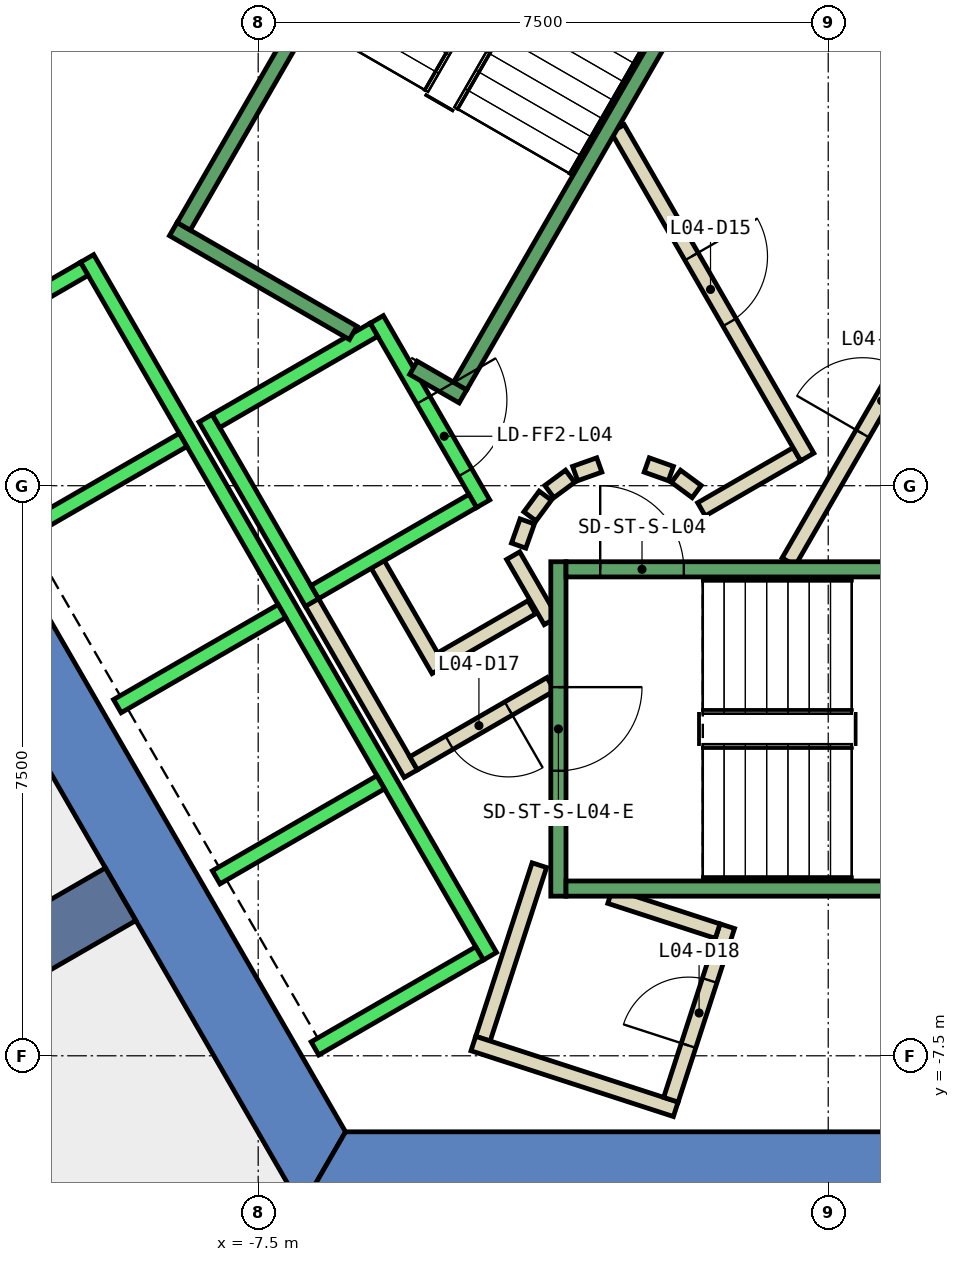
"""IFC4 building model, lengths in metres.
Left out: names, types, materials, properties, quantities, classifications, styles, units other than length and angle.
Written with IfcOpenShell. Run it as: python <this file> out.ifc"""

import sys

from ifc_helpers import new_model, si_unit, direction, frame, frame_2d, origin, place, context, subcontext, project, spatial, polyline, rectangle, outline, extrude, element, fill, save


model = new_model("IFC4")
c1 = context("Model", 3, precision=1e-05, world=origin(), true_north=direction((0.0, 1.0)))
c2 = subcontext(c1, "Body", "Model", "MODEL_VIEW")
j1 = project(units=[si_unit("LENGTHUNIT", "METRE"), si_unit("PLANEANGLEUNIT", "RADIAN")], contexts=[c1])
p1 = place(None, origin())
s1 = spatial("IfcSite", under=j1, at=p1, CompositionType="ELEMENT")
p2 = place(p1, origin())
s2 = spatial("IfcBuilding", under=s1, at=p2, CompositionType="ELEMENT")
p3 = place(p2, frame((0.0, 0.0, 25.0)))
s3 = spatial("IfcBuildingStorey", under=s2, at=p3, CompositionType="ELEMENT", Elevation=25.0)
p4 = place(p3, frame((0.0, 0.0, -0.45)))
e1 = element("IfcWall", 1, at=p4, inside=s3, PredefinedType="SHEAR", context=c2, shape_type="SweptSolid", body=[
    extrude(outline(polyline([(-12.267, 5.252), (-11.402, 4.752), (-6.351, 13.5), (-6.928, 14.5), (-12.267, 5.252)])), origin(), (0.0, 0.0, 1.0), 5.0),
])
p5 = place(p3, frame((0.0, 0.0, -0.45)))
e2 = element("IfcWall", 2, at=p5, inside=s3, PredefinedType="SHEAR", context=c2, shape_type="SweptSolid", body=[
    extrude(outline(polyline([(-13.856, 2.5), (-6.928, -9.5), (-6.351, -8.5), (-12.702, 2.5), (-13.856, 2.5)])), origin(), (0.0, 0.0, 1.0), 5.0),
])
p6 = place(p3, frame((0.0, 0.0, -0.45)))
e3 = element("IfcWall", 3, at=p6, inside=s3, PredefinedType="SHEAR", context=c2, shape_type="SweptSolid", body=[
    extrude(outline(polyline([(3.75, -9.5), (3.75, -8.5), (-6.351, -8.5), (-6.928, -9.5), (3.75, -9.5)])), origin(), (0.0, 0.0, 1.0), 5.0),
])
p7 = place(p3, frame((-9.31, -5.375, -0.45), z_axis=(0.0, 0.0, 1.0), x_axis=(-0.866017533419, -0.500013631625, 0.0)))
e4 = element("IfcWall", 4, at=p7, inside=s3, PredefinedType="SHEAR", context=c2, shape_type="SweptSolid", body=[
    extrude(rectangle(XDim=9.0, YDim=0.8, at=frame_2d((4.5, 0.0))), origin(), (0.0, 0.0, 1.0), 5.0),
])
p8 = place(p3, frame((-3.9, -1.599, 0.0), z_axis=(0.0, 0.0, 1.0), x_axis=(-0.865969445389, -0.500096910261, 0.0)))
e5 = element("IfcWall", 5, at=p8, inside=s3, PredefinedType="PARTITIONING", context=c2, shape_type="SweptSolid", body=[
    extrude(rectangle(XDim=1.373, YDim=0.2, at=frame_2d((0.687, 0.0))), origin(), (0.0, 0.0, 1.0), 4.55),
])
p9 = place(p3, frame((-5.126, -2.422, 0.0), z_axis=(0.0, 0.0, 1.0), x_axis=(-0.500062241894, 0.865989465428, 0.0)))
e6 = element("IfcWall", 6, at=p9, inside=s3, PredefinedType="PARTITIONING", context=c2, shape_type="SweptSolid", body=[
    extrude(rectangle(XDim=1.7, YDim=0.2, at=frame_2d((0.85, 0.0))), origin(), (0.0, 0.0, 1.0), 4.55),
])
p10 = place(p3, frame((-5.492, -3.788, 0.0), z_axis=(0.0, 0.0, 1.0), x_axis=(-0.500008949224, 0.866020236886, 0.0)))
e7 = element("IfcWall", 7, at=p10, inside=s3, PredefinedType="PARTITIONING", context=c2, shape_type="SweptSolid", body=[
    extrude(rectangle(XDim=2.68, YDim=0.2, at=frame_2d((1.34, 0.0))), origin(), (0.0, 0.0, 1.0), 4.55),
])
p11 = place(p3, frame((-4.145, -0.92, 0.0), z_axis=(0.0, 0.0, 1.0), x_axis=(0.499743786207, -0.866173278362, 0.0)))
e8 = element("IfcWall", 8, at=p11, inside=s3, PredefinedType="PARTITIONING", context=c2, shape_type="SweptSolid", body=[
    extrude(rectangle(XDim=0.991, YDim=0.2, at=frame_2d((0.495, 0.0))), origin(), (0.0, 0.0, 1.0), 4.55),
])
p12 = place(p3, frame((-3.65, -2.61, 0.0), z_axis=(0.0, 0.0, 1.0), x_axis=(-0.866072462134, -0.499918483688, 0.0)))
e9 = element("IfcWall", 9, at=p12, inside=s3, PredefinedType="PARTITIONING", context=c2, shape_type="SweptSolid", body=[
    extrude(rectangle(XDim=2.084, YDim=0.2, at=frame_2d((1.042, 0.0))), origin(), (0.0, 0.0, 1.0), 4.55),
])
p13 = place(p12, frame((0.642, 0.0, 0.0)))
e10 = element("IfcOpeningElement", 10, at=p13, cuts=e9, PredefinedType="OPENING", context=c2, shape_type="SweptSolid", body=[
    extrude(rectangle(XDim=0.9, YDim=2.1, at=frame_2d((0.45, 1.05))), frame((0.0, 0.11, 0.0), z_axis=(0.0, -1.0, 0.0), x_axis=(1.0, 0.0, 0.0)), (0.0, 0.0, 1.0), 0.22),
])
p14 = place(p3, frame((-3.801, -4.992, 0.0), z_axis=(0.0, 0.0, 1.0), x_axis=(-0.309079173229, -0.951036310914, 0.0)))
e11 = element("IfcWall", 11, at=p14, inside=s3, PredefinedType="PARTITIONING", context=c2, shape_type="SweptSolid", body=[
    extrude(rectangle(XDim=2.4, YDim=0.2, at=frame_2d((1.2, 0.0))), origin(), (0.0, 0.0, 1.0), 4.55),
])
p15 = place(p3, frame((-4.669, -7.339, 0.0), z_axis=(0.0, 0.0, 1.0), x_axis=(0.951079555704, -0.308946077369, 0.0)))
e12 = element("IfcWall", 12, at=p15, inside=s3, PredefinedType="PARTITIONING", context=c2, shape_type="SweptSolid", body=[
    extrude(rectangle(XDim=2.8, YDim=0.2, at=frame_2d((1.4, 0.0))), origin(), (0.0, 0.0, 1.0), 4.55),
])
p16 = place(p3, frame((-2.07, -8.078, 0.0), z_axis=(0.0, 0.0, 1.0), x_axis=(0.309171157328, 0.951006411901, 0.0)))
e13 = element("IfcWall", 13, at=p16, inside=s3, PredefinedType="PARTITIONING", context=c2, shape_type="SweptSolid", body=[
    extrude(rectangle(XDim=2.401, YDim=0.2, at=frame_2d((1.2, 0.0))), origin(), (0.0, 0.0, 1.0), 4.55),
])
p17 = place(p16, frame((0.75, 0.0, 0.0)))
e14 = element("IfcOpeningElement", 14, at=p17, cuts=e13, PredefinedType="OPENING", context=c2, shape_type="SweptSolid", body=[
    extrude(rectangle(XDim=0.9, YDim=2.1, at=frame_2d((0.45, 1.05))), frame((0.0, 0.11, 0.0), z_axis=(0.0, -1.0, 0.0), x_axis=(1.0, 0.0, 0.0)), (0.0, 0.0, 1.0), 0.22),
])
p18 = place(p3, frame((-1.455, -5.86, 0.0), z_axis=(0.0, 0.0, 1.0), x_axis=(-0.950892787506, 0.309520446287, 0.0)))
e15 = element("IfcWall", 15, at=p18, inside=s3, PredefinedType="PARTITIONING", context=c2, shape_type="SweptSolid", body=[
    extrude(rectangle(XDim=1.487, YDim=0.2, at=frame_2d((0.743, 0.0))), origin(), (0.0, 0.0, 1.0), 4.55),
])
p19 = place(p3, frame((-0.52, -1.0, 0.0), z_axis=(0.0, 0.0, 1.0), x_axis=(0.50011622646, 0.865958290007, 0.0)))
e16 = element("IfcWall", 16, at=p19, inside=s3, PredefinedType="PARTITIONING", context=c2, shape_type="SweptSolid", body=[
    extrude(rectangle(XDim=4.991, YDim=0.2, at=frame_2d((2.496, 0.0))), origin(), (0.0, 0.0, 1.0), 4.55),
])
p20 = place(p19, frame((1.945, 0.0, 0.0)))
e17 = element("IfcOpeningElement", 17, at=p20, cuts=e16, PredefinedType="OPENING", context=c2, shape_type="SweptSolid", body=[
    extrude(rectangle(XDim=1.0, YDim=2.1, at=frame_2d((0.5, 1.05))), frame((0.0, 0.11, 0.0), z_axis=(0.0, -1.0, 0.0), x_axis=(1.0, 0.0, 0.0)), (0.0, 0.0, 1.0), 0.22),
])
p21 = place(p3, frame((-0.412, 0.414, 0.0), z_axis=(0.0, 0.0, 1.0), x_axis=(-0.866017369001, -0.500013916395, 0.0)))
e18 = element("IfcWall", 18, at=p21, inside=s3, PredefinedType="PARTITIONING", context=c2, shape_type="SweptSolid", body=[
    extrude(rectangle(XDim=1.45, YDim=0.2, at=frame_2d((0.725, 0.0))), origin(), (0.0, 0.0, 1.0), 4.55),
])
p22 = place(p3, frame((-1.731, -0.077, 0.0), z_axis=(0.0, 0.0, 1.0), x_axis=(-0.804311165252, 0.594208338422, 0.0)))
e19 = element("IfcWall", 19, at=p22, inside=s3, PredefinedType="PARTITIONING", context=c2, shape_type="SweptSolid", body=[
    extrude(rectangle(XDim=0.338, YDim=0.2, at=frame_2d((0.169, 0.0))), origin(), (0.0, 0.0, 1.0), 4.55),
])
p23 = place(p3, frame((-2.07, 0.16, 0.0), z_axis=(0.0, 0.0, 1.0), x_axis=(-0.942199461132, 0.335052496547, 0.0)))
e20 = element("IfcWall", 20, at=p23, inside=s3, PredefinedType="PARTITIONING", context=c2, shape_type="SweptSolid", body=[
    extrude(rectangle(XDim=0.337, YDim=0.2, at=frame_2d((0.169, 0.0))), origin(), (0.0, 0.0, 1.0), 4.55),
])
p24 = place(p3, frame((-3.012, 0.273, 0.0), z_axis=(0.0, 0.0, 1.0), x_axis=(-0.942280615813, -0.334824194261, 0.0)))
e21 = element("IfcWall", 21, at=p24, inside=s3, PredefinedType="PARTITIONING", context=c2, shape_type="SweptSolid", body=[
    extrude(rectangle(XDim=0.338, YDim=0.2, at=frame_2d((0.169, 0.0))), origin(), (0.0, 0.0, 1.0), 4.55),
])
p25 = place(p3, frame((-3.397, 0.124, 0.0), z_axis=(0.0, 0.0, 1.0), x_axis=(-0.804311165252, -0.594208338422, 0.0)))
e22 = element("IfcWall", 22, at=p25, inside=s3, PredefinedType="PARTITIONING", context=c2, shape_type="SweptSolid", body=[
    extrude(rectangle(XDim=0.338, YDim=0.2, at=frame_2d((0.169, 0.0))), origin(), (0.0, 0.0, 1.0), 4.55),
])
p26 = place(p3, frame((-3.723, -0.131, 0.0), z_axis=(0.0, 0.0, 1.0), x_axis=(-0.594675113454, -0.803966112121, 0.0)))
e23 = element("IfcWall", 23, at=p26, inside=s3, PredefinedType="PARTITIONING", context=c2, shape_type="SweptSolid", body=[
    extrude(rectangle(XDim=0.338, YDim=0.2, at=frame_2d((0.169, 0.0))), origin(), (0.0, 0.0, 1.0), 4.55),
])
p27 = place(p3, frame((-3.96, -0.47, 0.0), z_axis=(0.0, 0.0, 1.0), x_axis=(-0.334824194261, -0.942280615813, 0.0)))
e24 = element("IfcWall", 24, at=p27, inside=s3, PredefinedType="PARTITIONING", context=c2, shape_type="SweptSolid", body=[
    extrude(rectangle(XDim=0.338, YDim=0.2, at=frame_2d((0.169, 0.0))), origin(), (0.0, 0.0, 1.0), 4.55),
])
p28 = place(p3, frame((-2.771, 4.7, 0.0), z_axis=(0.0, 0.0, 1.0), x_axis=(0.499969479948, -0.866043023828, 0.0)))
e25 = element("IfcWall", 25, at=p28, inside=s3, PredefinedType="PARTITIONING", context=c2, shape_type="SweptSolid", body=[
    extrude(rectangle(XDim=4.99, YDim=0.2, at=frame_2d((2.495, 0.0))), origin(), (0.0, 0.0, 1.0), 4.55),
])
p29 = place(p28, frame((1.945, 0.0, 0.0)))
e26 = element("IfcOpeningElement", 26, at=p29, cuts=e25, PredefinedType="OPENING", context=c2, shape_type="SweptSolid", body=[
    extrude(rectangle(XDim=1.0, YDim=2.1, at=frame_2d((0.5, 1.05))), frame((0.0, 0.11, 0.0), z_axis=(0.0, -1.0, 0.0), x_axis=(1.0, 0.0, 0.0)), (0.0, 0.0, 1.0), 0.22),
])
p30 = place(p3, frame((-5.94, 2.188, 0.0), z_axis=(0.0, 0.0, 1.0), x_axis=(0.49994636267, -0.866056369097, 0.0)))
e27 = element("IfcWall", 27, at=p30, inside=s3, PredefinedType="STANDARD", context=c2, shape_type="SweptSolid", body=[
    extrude(rectangle(XDim=2.8, YDim=0.2, at=frame_2d((1.4, 0.0))), origin(), (0.0, 0.0, 1.0), 4.55),
])
p31 = place(p30, frame((1.225, 0.0, 0.0)))
e28 = element("IfcOpeningElement", 28, at=p31, cuts=e27, PredefinedType="OPENING", context=c2, shape_type="SweptSolid", body=[
    extrude(rectangle(XDim=1.1, YDim=2.1, at=frame_2d((0.55, 1.05))), frame((0.0, 0.11, 0.0), z_axis=(0.0, -1.0, 0.0), x_axis=(1.0, 0.0, 0.0)), (0.0, 0.0, 1.0), 0.22),
])
p32 = place(p3, frame((-8.192, 0.888, 0.0), z_axis=(0.0, 0.0, 1.0), x_axis=(0.49994636267, -0.866056369097, 0.0)))
e29 = element("IfcWall", 29, at=p32, inside=s3, PredefinedType="STANDARD", context=c2, shape_type="SweptSolid", body=[
    extrude(rectangle(XDim=2.8, YDim=0.2, at=frame_2d((1.4, 0.0))), origin(), (0.0, 0.0, 1.0), 4.55),
])
for number, where, z_axis, x_axis in (
    (30, (-5.977, 2.052, 0.0), (0.0, 0.0, 1.0), (-0.866, -0.5, 0.0)),
    (31, (-4.677, -0.2, 0.0), (0.0, 0.0, 1.0), (-0.866, -0.5, 0.0)),
):
    element("IfcWall", number, at=place(p3, frame(where, z_axis=z_axis, x_axis=x_axis)), inside=s3, PredefinedType="STANDARD", context=c2, shape_type="SweptSolid", body=[
        extrude(rectangle(XDim=2.399, YDim=0.2, at=frame_2d((1.2, 0.0))), origin(), (0.0, 0.0, 1.0), 4.55),
    ])
p33 = place(p3, frame((-9.751, 2.99, 0.0), z_axis=(0.0, 0.0, 1.0), x_axis=(0.50000090737, -0.866024879913, 0.0)))
e32 = element("IfcWall", 32, at=p33, inside=s3, PredefinedType="STANDARD", context=c2, shape_type="SweptSolid", body=[
    extrude(rectangle(XDim=10.6, YDim=0.2, at=frame_2d((5.3, 0.0))), origin(), (0.0, 0.0, 1.0), 4.55),
])
p34 = place(p3, frame((-9.788, 2.853, 0.0), z_axis=(0.0, 0.0, 1.0), x_axis=(-0.865998541277, -0.500046524342, 0.0)))
e33 = element("IfcWall", 33, at=p34, inside=s3, PredefinedType="STANDARD", context=c2, shape_type="SweptSolid", body=[
    extrude(rectangle(XDim=2.5, YDim=0.2, at=frame_2d((1.25, 0.0))), origin(), (0.0, 0.0, 1.0), 4.55),
])
for number, where, z_axis, x_axis in (
    (34, (-8.488, 0.602, 0.0), (0.0, 0.0, 1.0), (-0.866, -0.5, 0.0)),
    (35, (-7.188, -1.65, 0.0), (0.0, 0.0, 1.0), (-0.866, -0.5, 0.0)),
    (36, (-5.888, -3.902, 0.0), (0.0, 0.0, 1.0), (-0.866, -0.5, 0.0)),
    (37, (-4.588, -6.153, 0.0), (0.0, 0.0, 1.0), (-0.866, -0.5, 0.0)),
):
    element("IfcWall", number, at=place(p3, frame(where, z_axis=z_axis, x_axis=x_axis)), inside=s3, PredefinedType="STANDARD", context=c2, shape_type="SweptSolid", body=[
        extrude(rectangle(XDim=2.5, YDim=0.2, at=frame_2d((1.25, 0.0))), origin(), (0.0, 0.0, 1.0), 4.55),
    ])
p35 = place(p3, frame((-3.55, -1.0, 0.0), z_axis=(0.0, 0.0, 1.0), x_axis=(0.0, -1.0, 0.0)))
e38 = element("IfcWall", 38, at=p35, inside=s3, PredefinedType="STANDARD", context=c2, shape_type="SweptSolid", body=[
    extrude(rectangle(XDim=4.4, YDim=0.2, at=frame_2d((2.2, 0.0))), origin(), (0.0, 0.0, 1.0), 4.55),
])
p36 = place(p35, frame((1.65, 0.0, 0.0)))
e39 = element("IfcOpeningElement", 39, at=p36, cuts=e38, PredefinedType="OPENING", context=c2, shape_type="SweptSolid", body=[
    extrude(rectangle(XDim=1.1, YDim=2.2, at=frame_2d((0.55, 1.1))), frame((0.0, 0.11, 0.0), z_axis=(0.0, -1.0, 0.0), x_axis=(1.0, 0.0, 0.0)), (0.0, 0.0, 1.0), 0.22),
])
p37 = place(p3, frame((-3.45, -1.1, 0.0), z_axis=(0.0, 0.0, 1.0), x_axis=(1.0, 0.0, 0.0)))
e40 = element("IfcWall", 40, at=p37, inside=s3, PredefinedType="STANDARD", context=c2, shape_type="SweptSolid", body=[
    extrude(rectangle(XDim=6.9, YDim=0.2, at=frame_2d((3.45, 0.0))), origin(), (0.0, 0.0, 1.0), 4.55),
])
p38 = place(p37, frame((0.45, 0.0, 0.0)))
e41 = element("IfcOpeningElement", 41, at=p38, cuts=e40, PredefinedType="OPENING", context=c2, shape_type="SweptSolid", body=[
    extrude(rectangle(XDim=1.1, YDim=2.2, at=frame_2d((0.55, 1.1))), frame((0.0, 0.11, 0.0), z_axis=(0.0, -1.0, 0.0), x_axis=(1.0, 0.0, 0.0)), (0.0, 0.0, 1.0), 0.22),
])
p39 = place(p3, frame((-3.45, -5.3, 0.0), z_axis=(0.0, 0.0, 1.0), x_axis=(1.0, 0.0, 0.0)))
e42 = element("IfcWall", 42, at=p39, inside=s3, PredefinedType="STANDARD", context=c2, shape_type="SweptSolid", body=[
    extrude(rectangle(XDim=6.9, YDim=0.2, at=frame_2d((3.45, 0.0))), origin(), (0.0, 0.0, 1.0), 4.55),
])
p40 = place(p3, frame((-6.25, 2.01, 0.0), z_axis=(0.0, 0.0, 1.0), x_axis=(-0.86611865017, 0.499838457731, 0.0)))
e43 = element("IfcWall", 43, at=p40, inside=s3, PredefinedType="STANDARD", context=c2, shape_type="SweptSolid", body=[
    extrude(rectangle(XDim=2.733, YDim=0.2, at=frame_2d((1.366, 0.0))), origin(), (0.0, 0.0, 1.0), 4.55),
])
p41 = place(p3, frame((-4.806, 1.176, 0.0), z_axis=(0.0, 0.0, 1.0), x_axis=(-0.866558586415, 0.499075361355, 0.0)))
e44 = element("IfcWall", 44, at=p41, inside=s3, PredefinedType="STANDARD", context=c2, shape_type="SweptSolid", body=[
    extrude(rectangle(XDim=0.751, YDim=0.2, at=frame_2d((0.376, 0.0))), origin(), (0.0, 0.0, 1.0), 4.55),
])
p42 = place(p3, frame((-1.393, 7.288, 0.0), z_axis=(0.0, 0.0, 1.0), x_axis=(-0.499963383562, -0.866046543262, 0.0)))
e45 = element("IfcWall", 45, at=p42, inside=s3, PredefinedType="STANDARD", context=c2, shape_type="SweptSolid", body=[
    extrude(rectangle(XDim=6.9, YDim=0.2, at=frame_2d((3.45, 0.0))), origin(), (0.0, 0.0, 1.0), 4.55),
])
p43 = place(p42, frame((0.45, 0.0, 0.0)))
e46 = element("IfcOpeningElement", 46, at=p43, cuts=e45, PredefinedType="OPENING", context=c2, shape_type="SweptSolid", body=[
    extrude(rectangle(XDim=1.1, YDim=2.2, at=frame_2d((0.55, 1.1))), frame((0.0, 0.11, 0.0), z_axis=(0.0, -1.0, 0.0), x_axis=(1.0, 0.0, 0.0)), (0.0, 0.0, 1.0), 0.22),
])
p44 = place(p3, frame((-5.03, 9.388, 0.0), z_axis=(0.0, 0.0, 1.0), x_axis=(-0.499978703459, -0.866037698999, 0.0)))
e47 = element("IfcWall", 47, at=p44, inside=s3, PredefinedType="STANDARD", context=c2, shape_type="SweptSolid", body=[
    extrude(rectangle(XDim=6.9, YDim=0.2, at=frame_2d((3.45, 0.0))), origin(), (0.0, 0.0, 1.0), 4.55),
])
p45 = place(p20, origin())
e48 = element("IfcDoor", 48, at=p45, inside=s3, OperationType="SINGLE_SWING_LEFT", PredefinedType="DOOR", context=c2, shape_type="SweptSolid", body=[
    extrude(rectangle(XDim=1.0, YDim=2.1, at=frame_2d((0.5, 1.05))), frame((0.0, 0.025, 0.0), z_axis=(0.0, -1.0, 0.0), x_axis=(1.0, 0.0, 0.0)), (0.0, 0.0, 1.0), 0.05),
])
fill(e17, e48)
p46 = place(p29, origin())
e49 = element("IfcDoor", 49, at=p46, inside=s3, OperationType="SINGLE_SWING_RIGHT", PredefinedType="DOOR", context=c2, shape_type="SweptSolid", body=[
    extrude(rectangle(XDim=1.0, YDim=2.1, at=frame_2d((0.5, 1.05))), frame((0.0, 0.025, 0.0), z_axis=(0.0, -1.0, 0.0), x_axis=(1.0, 0.0, 0.0)), (0.0, 0.0, 1.0), 0.05),
])
fill(e26, e49)
p47 = place(p13, origin())
e50 = element("IfcDoor", 50, at=p47, inside=s3, OperationType="SINGLE_SWING_LEFT", PredefinedType="DOOR", context=c2, shape_type="SweptSolid", body=[
    extrude(rectangle(XDim=0.9, YDim=2.1, at=frame_2d((0.45, 1.05))), frame((0.0, 0.025, 0.0), z_axis=(0.0, -1.0, 0.0), x_axis=(1.0, 0.0, 0.0)), (0.0, 0.0, 1.0), 0.05),
])
fill(e10, e50)
p48 = place(p17, origin())
e51 = element("IfcDoor", 51, at=p48, inside=s3, OperationType="SINGLE_SWING_LEFT", PredefinedType="DOOR", context=c2, shape_type="SweptSolid", body=[
    extrude(rectangle(XDim=0.9, YDim=2.1, at=frame_2d((0.45, 1.05))), frame((0.0, 0.025, 0.0), z_axis=(0.0, -1.0, 0.0), x_axis=(1.0, 0.0, 0.0)), (0.0, 0.0, 1.0), 0.05),
])
fill(e14, e51)
p49 = place(p31, origin())
e52 = element("IfcDoor", 52, at=p49, inside=s3, OperationType="SLIDING_TO_LEFT", PredefinedType="DOOR", context=c2, shape_type="SweptSolid", body=[
    extrude(rectangle(XDim=1.1, YDim=2.1, at=frame_2d((0.55, 1.05))), frame((0.0, 0.025, 0.0), z_axis=(0.0, -1.0, 0.0), x_axis=(1.0, 0.0, 0.0)), (0.0, 0.0, 1.0), 0.05),
])
fill(e28, e52)
p50 = place(p38, origin())
e53 = element("IfcDoor", 53, at=p50, inside=s3, OperationType="SINGLE_SWING_LEFT", PredefinedType="DOOR", context=c2, shape_type="SweptSolid", body=[
    extrude(rectangle(XDim=1.1, YDim=2.2, at=frame_2d((0.55, 1.1))), frame((0.0, 0.025, 0.0), z_axis=(0.0, -1.0, 0.0), x_axis=(1.0, 0.0, 0.0)), (0.0, 0.0, 1.0), 0.05),
])
fill(e41, e53)
p51 = place(p36, origin())
e54 = element("IfcDoor", 54, at=p51, inside=s3, OperationType="SINGLE_SWING_LEFT", PredefinedType="DOOR", context=c2, shape_type="SweptSolid", body=[
    extrude(rectangle(XDim=1.1, YDim=2.2, at=frame_2d((0.55, 1.1))), frame((0.0, 0.025, 0.0), z_axis=(0.0, -1.0, 0.0), x_axis=(1.0, 0.0, 0.0)), (0.0, 0.0, 1.0), 0.05),
])
fill(e39, e54)
save(model, sys.argv[1])
